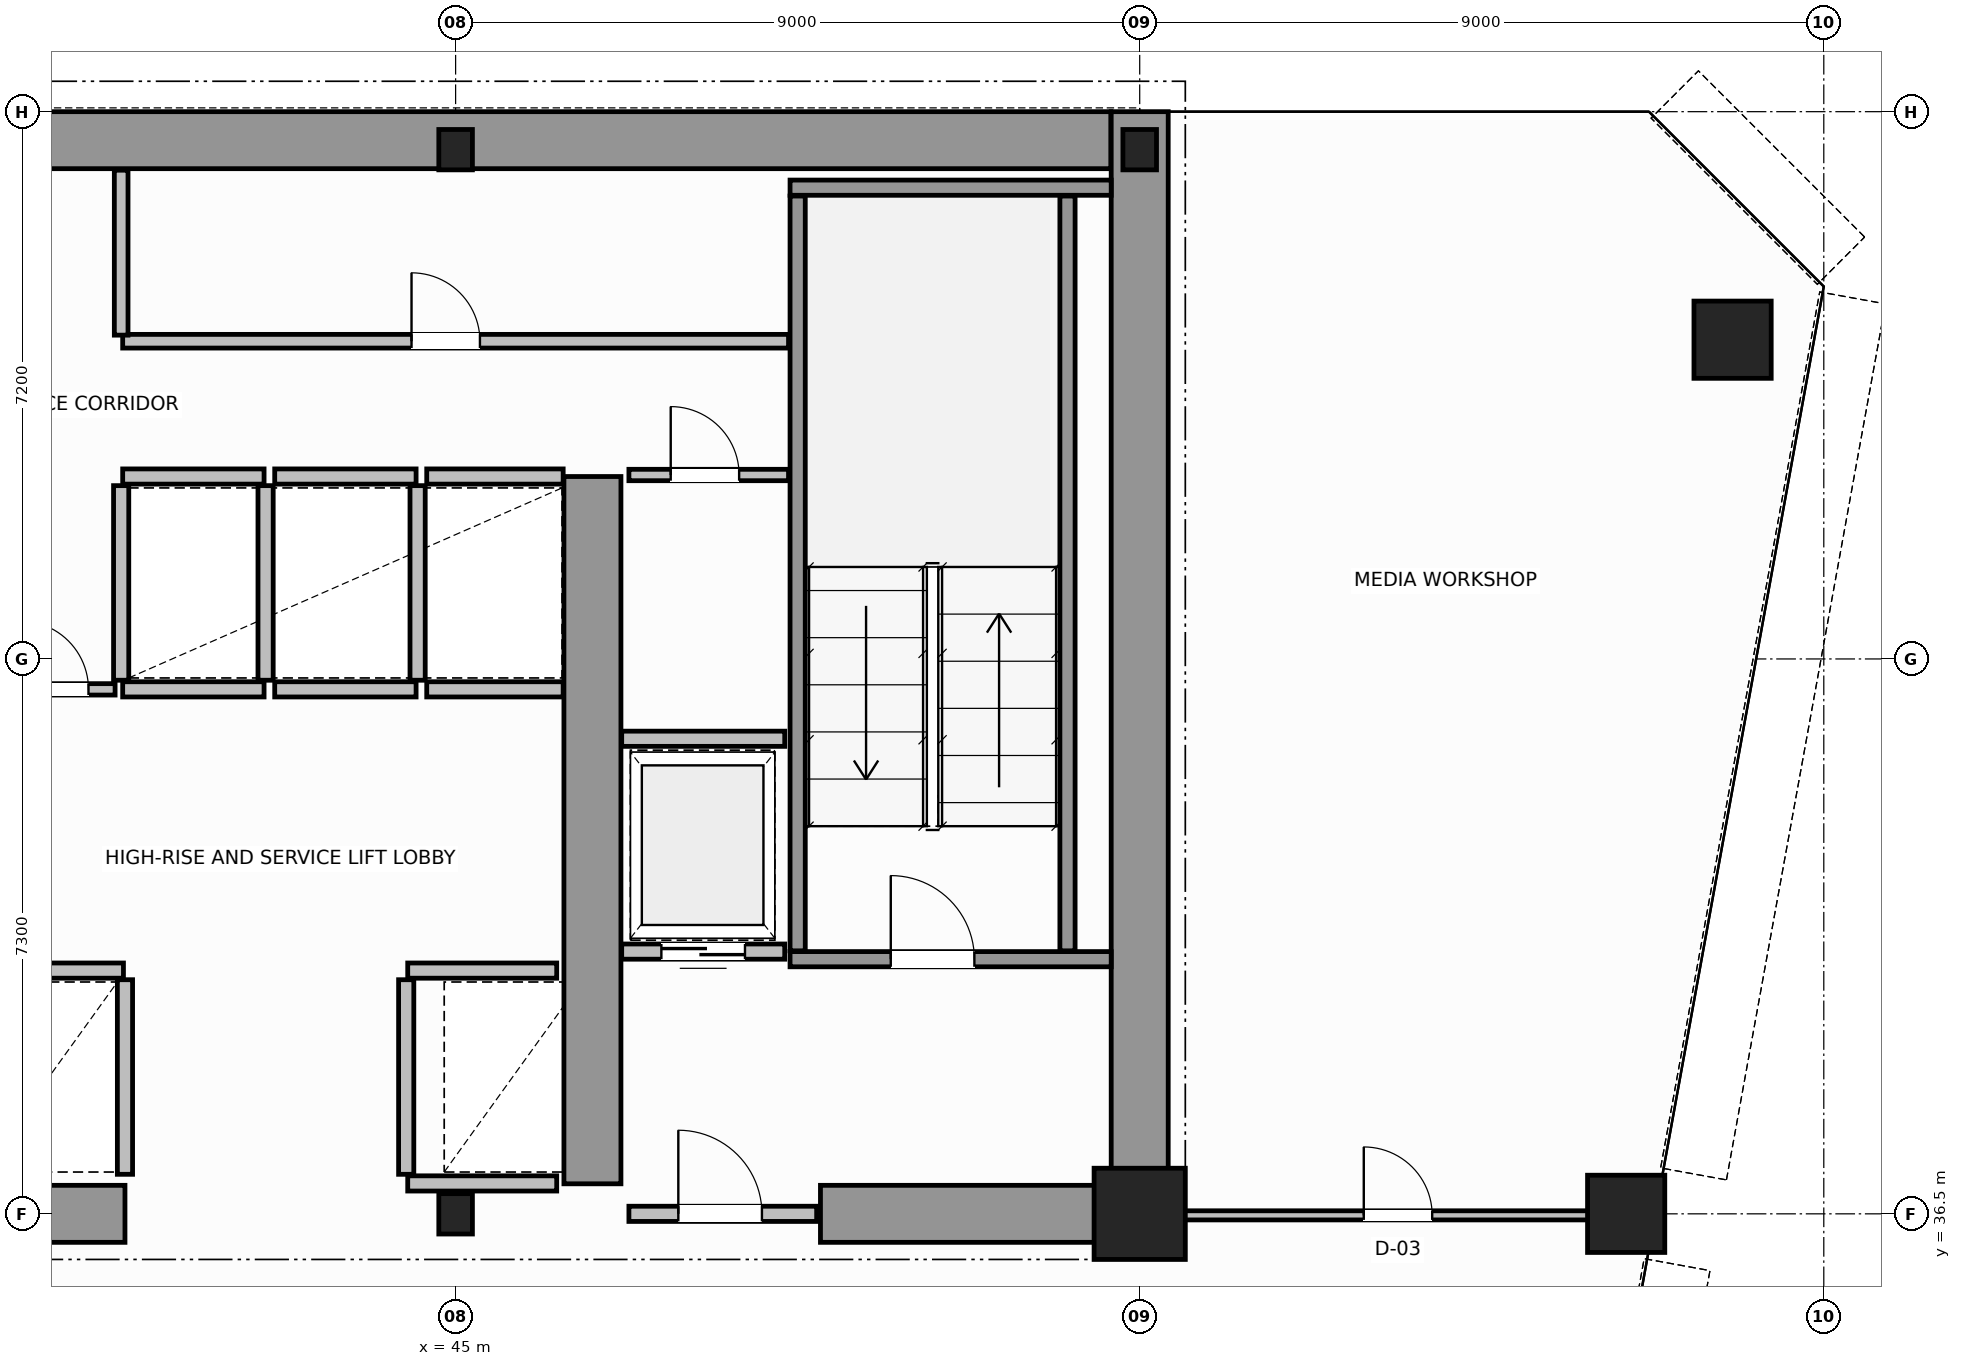
"""IFC4 building model, lengths in metres.
Left out: names, types, materials, properties, quantities, classifications, styles, units other than length and angle.
Written with IfcOpenShell. Run it as: python <this file> out.ifc"""

import sys

from ifc_helpers import new_model, si_unit, direction, frame, frame_2d, origin, origin_2d, place, context, subcontext, project, spatial, rectangle, hollow_circle, i_section, extrude, source, transform, mapped, element, fill, save


model = new_model("IFC4")
c1 = context("Model", 3, precision=1e-05, world=origin(), true_north=direction((0.0, 1.0)))
c2 = subcontext(c1, "Body", "Model", "MODEL_VIEW")
j1 = project(units=[si_unit("LENGTHUNIT", "METRE"), si_unit("PLANEANGLEUNIT", "RADIAN")], contexts=[c1])
p1 = place(None, origin())
s1 = spatial("IfcSite", under=j1, at=p1, CompositionType="ELEMENT")
p2 = place(p1, origin())
s2 = spatial("IfcBuilding", under=s1, at=p2, CompositionType="ELEMENT")
p3 = place(p2, frame((0.0, 0.0, 133.8)))
s3 = spatial("IfcBuildingStorey", under=s2, at=p3, CompositionType="ELEMENT", Elevation=133.8)
m1 = source(origin(), c2, "Body", "SweptSolid", [
    extrude(i_section(OverallWidth=0.442, OverallDepth=0.531, WebThickness=0.065, FlangeThickness=0.076, FilletRadius=0.015, at=origin_2d()), origin(), (0.0, 0.0, 1.0), 3.8),
])
p4 = place(p3, frame((45.0, 36.5, 0.0), z_axis=(0.0, 0.0, 1.0), x_axis=(1.0, 0.0, 0.0)))
e1 = element("IfcColumn", 1, at=p4, inside=s3, PredefinedType="COLUMN", context=c2, shape_type="MappedRepresentation", body=[
    mapped(m1, transform((0.0, 0.0, 0.0), scale=1.0)),
])
m2 = source(origin(), c2, "Body", "SweptSolid", [
    extrude(rectangle(XDim=1.2, YDim=1.2, at=origin_2d()), origin(), (0.0, 0.0, 1.0), 3.8),
])
p5 = place(p3, frame((54.0, 36.5, 0.0), z_axis=(0.0, 0.0, 1.0), x_axis=(1.0, 0.0, 0.0)))
e2 = element("IfcColumn", 2, at=p5, inside=s3, PredefinedType="COLUMN", context=c2, shape_type="MappedRepresentation", body=[
    mapped(m2, transform((0.0, 0.0, 0.0), scale=1.0)),
])
for number, where, z_axis, x_axis in (
    (3, (45.0, 50.5, 0.0), (0.0, 0.0, 1.0), (1.0, 0.0, 0.0)),
    (4, (54.0, 50.5, 0.0), (0.0, 0.0, 1.0), (1.0, 0.0, 0.0)),
):
    element("IfcColumn", number, at=place(p3, frame(where, z_axis=z_axis, x_axis=x_axis)), inside=s3, PredefinedType="COLUMN", context=c2, shape_type="MappedRepresentation", body=[
        mapped(m1, transform((0.0, 0.0, 0.0), scale=1.0)),
    ])
m3 = source(origin(), c2, "Body", "SweptSolid", [
    extrude(hollow_circle(Radius=0.508, WallThickness=0.045, at=origin_2d()), origin(), (0.0, 0.0, 1.0), 3.8),
])
for number, where, z_axis, x_axis in (
    (5, (61.8, 48.0, 0.0), (0.0, 0.0, 1.0), (1.0, 0.0, 0.0)),
    (6, (60.4, 36.5, 0.0), (0.0, 0.0, 1.0), (1.0, 0.0, 0.0)),
):
    element("IfcColumn", number, at=place(p3, frame(where, z_axis=z_axis, x_axis=x_axis)), inside=s3, PredefinedType="COLUMN", context=c2, shape_type="MappedRepresentation", body=[
        mapped(m3, transform((0.0, 0.0, 0.0), scale=1.0)),
    ])
p6 = place(p3, frame((34.002, 50.625, 0.0), z_axis=(0.0, 0.0, 1.0), x_axis=(1.0, 0.0, 0.0)))
e7 = element("IfcWall", 7, at=p6, inside=s3, PredefinedType="SHEAR", context=c2, shape_type="SweptSolid", body=[
    extrude(rectangle(XDim=19.619, YDim=0.75, at=frame_2d((9.81, 0.0))), origin(), (0.0, 0.0, 1.0), 3.8),
])
p7 = place(p3, frame((54.0, 36.5, 0.0), z_axis=(0.0, 0.0, 1.0), x_axis=(0.0, 1.0, 0.0)))
e8 = element("IfcWall", 8, at=p7, inside=s3, PredefinedType="SHEAR", context=c2, shape_type="SweptSolid", body=[
    extrude(rectangle(XDim=14.5, YDim=0.75, at=frame_2d((7.25, 0.0))), origin(), (0.0, 0.0, 1.0), 3.8),
])
p8 = place(p3, frame((36.15, 36.5, 0.0), z_axis=(0.0, 0.0, 1.0), x_axis=(1.0, 0.0, 0.0)))
e9 = element("IfcWall", 9, at=p8, inside=s3, PredefinedType="SHEAR", context=c2, shape_type="SweptSolid", body=[
    extrude(rectangle(XDim=4.5, YDim=0.75, at=frame_2d((2.25, 0.0))), origin(), (0.0, 0.0, 1.0), 3.8),
])
p9 = place(p3, frame((49.8, 36.5, 0.0), z_axis=(0.0, 0.0, 1.0), x_axis=(1.0, 0.0, 0.0)))
e10 = element("IfcWall", 10, at=p9, inside=s3, PredefinedType="SHEAR", context=c2, shape_type="SweptSolid", body=[
    extrude(rectangle(XDim=3.805, YDim=0.75, at=frame_2d((1.902, 0.0))), origin(), (0.0, 0.0, 1.0), 2.38),
])
p10 = place(p3, frame((46.8, 36.895, 0.0), z_axis=(0.0, 0.0, 1.0), x_axis=(0.0, 1.0, 0.0)))
e11 = element("IfcWall", 11, at=p10, inside=s3, PredefinedType="SHEAR", context=c2, shape_type="SweptSolid", body=[
    extrude(rectangle(XDim=9.305, YDim=0.75, at=frame_2d((4.652, 0.0))), origin(), (0.0, 0.0, 1.0), 3.8),
])
p11 = place(p3, frame((49.4, 39.85, 0.0), z_axis=(0.0, 0.0, 1.0), x_axis=(1.0, 0.0, 0.0)))
e12 = element("IfcWall", 12, at=p11, inside=s3, PredefinedType="SOLIDWALL", context=c2, shape_type="SweptSolid", body=[
    extrude(rectangle(XDim=4.225, YDim=0.2, at=frame_2d((2.113, 0.0))), origin(), (0.0, 0.0, 1.0), 3.8),
])
p12 = place(p11, frame((1.325, 0.0, 0.0)))
e13 = element("IfcOpeningElement", 13, at=p12, cuts=e12, PredefinedType="OPENING", context=c2, shape_type="SweptSolid", body=[
    extrude(rectangle(XDim=1.1, YDim=2.15, at=frame_2d((0.55, 1.075))), frame((0.0, 0.11, 0.0), z_axis=(0.0, -1.0, 0.0), x_axis=(1.0, 0.0, 0.0)), (0.0, 0.0, 1.0), 0.22),
])
p13 = place(p3, frame((49.4, 50.0, 0.0), z_axis=(0.0, 0.0, 1.0), x_axis=(1.0, 0.0, 0.0)))
e14 = element("IfcWall", 14, at=p13, inside=s3, PredefinedType="SOLIDWALL", context=c2, shape_type="SweptSolid", body=[
    extrude(rectangle(XDim=4.225, YDim=0.2, at=frame_2d((2.113, 0.0))), origin(), (0.0, 0.0, 1.0), 3.8),
])
for number, where, z_axis, x_axis in (
    (15, (49.5, 39.96, 0.0), (0.0, 0.0, 1.0), (0.0, 1.0, 0.0)),
    (16, (53.05, 39.96, 0.0), (0.0, 0.0, 1.0), (0.0, 1.0, 0.0)),
):
    element("IfcWall", number, at=place(p3, frame(where, z_axis=z_axis, x_axis=x_axis)), inside=s3, PredefinedType="SOLIDWALL", context=c2, shape_type="SweptSolid", body=[
        extrude(rectangle(XDim=9.93, YDim=0.2, at=frame_2d((4.965, 0.0))), origin(), (0.0, 0.0, 1.0), 3.8),
    ])
p14 = place(p3, frame((47.28, 36.5, 0.0), z_axis=(0.0, 0.0, 1.0), x_axis=(1.0, 0.0, 0.0)))
e17 = element("IfcWall", 17, at=p14, inside=s3, PredefinedType="SOLIDWALL", context=c2, shape_type="SweptSolid", body=[
    extrude(rectangle(XDim=2.47, YDim=0.2, at=frame_2d((1.235, 0.0))), origin(), (0.0, 0.0, 1.0), 2.37),
])
p15 = place(p14, frame((0.65, 0.0, 0.0)))
e18 = element("IfcOpeningElement", 18, at=p15, cuts=e17, PredefinedType="OPENING", context=c2, shape_type="SweptSolid", body=[
    extrude(rectangle(XDim=1.1, YDim=2.15, at=frame_2d((0.55, 1.075))), frame((0.0, 0.11, 0.0), z_axis=(0.0, -1.0, 0.0), x_axis=(1.0, 0.0, 0.0)), (0.0, 0.0, 1.0), 0.22),
])
p16 = place(p3, frame((38.785, 39.7, 0.0), z_axis=(0.0, 0.0, 1.0), x_axis=(1.0, 0.0, 0.0)))
e19 = element("IfcWall", 19, at=p16, inside=s3, PredefinedType="SOLIDWALL", context=c2, shape_type="SweptSolid", body=[
    extrude(rectangle(XDim=1.845, YDim=0.2, at=frame_2d((0.922, 0.0))), origin(), (0.0, 0.0, 1.0), 3.58),
])
p17 = place(p3, frame((40.65, 37.02, 0.0), z_axis=(0.0, 0.0, 1.0), x_axis=(0.0, 1.0, 0.0)))
e20 = element("IfcWall", 20, at=p17, inside=s3, PredefinedType="SOLIDWALL", context=c2, shape_type="SweptSolid", body=[
    extrude(rectangle(XDim=2.56, YDim=0.2, at=frame_2d((1.28, 0.0))), origin(), (0.0, 0.0, 1.0), 3.58),
])
p18 = place(p3, frame((44.37, 39.7, 0.0), z_axis=(0.0, 0.0, 1.0), x_axis=(1.0, 0.0, 0.0)))
e21 = element("IfcWall", 21, at=p18, inside=s3, PredefinedType="SOLIDWALL", context=c2, shape_type="SweptSolid", body=[
    extrude(rectangle(XDim=1.96, YDim=0.2, at=frame_2d((0.98, 0.0))), origin(), (0.0, 0.0, 1.0), 3.58),
])
p19 = place(p3, frame((44.37, 36.9, 0.0), z_axis=(0.0, 0.0, 1.0), x_axis=(1.0, 0.0, 0.0)))
e22 = element("IfcWall", 22, at=p19, inside=s3, PredefinedType="SOLIDWALL", context=c2, shape_type="SweptSolid", body=[
    extrude(rectangle(XDim=1.96, YDim=0.2, at=frame_2d((0.98, 0.0))), origin(), (0.0, 0.0, 1.0), 2.37),
])
p20 = place(p3, frame((44.35, 37.02, 0.0), z_axis=(0.0, 0.0, 1.0), x_axis=(0.0, 1.0, 0.0)))
e23 = element("IfcWall", 23, at=p20, inside=s3, PredefinedType="SOLIDWALL", context=c2, shape_type="SweptSolid", body=[
    extrude(rectangle(XDim=2.56, YDim=0.2, at=frame_2d((1.28, 0.0))), origin(), (0.0, 0.0, 1.0), 3.58),
])
for number, where, z_axis, x_axis in (
    (24, (40.62, 43.4, 0.0), (0.0, 0.0, 1.0), (1.0, 0.0, 0.0)),
    (25, (40.62, 46.2, 0.0), (0.0, 0.0, 1.0), (1.0, 0.0, 0.0)),
):
    element("IfcWall", number, at=place(p3, frame(where, z_axis=z_axis, x_axis=x_axis)), inside=s3, PredefinedType="SOLIDWALL", context=c2, shape_type="SweptSolid", body=[
        extrude(rectangle(XDim=1.86, YDim=0.2, at=frame_2d((0.93, 0.0))), origin(), (0.0, 0.0, 1.0), 3.58),
    ])
for number, where, z_axis, x_axis in (
    (26, (40.6, 43.52, 0.0), (0.0, 0.0, 1.0), (0.0, 1.0, 0.0)),
    (27, (42.5, 43.52, 0.0), (0.0, 0.0, 1.0), (0.0, 1.0, 0.0)),
):
    element("IfcWall", number, at=place(p3, frame(where, z_axis=z_axis, x_axis=x_axis)), inside=s3, PredefinedType="SOLIDWALL", context=c2, shape_type="SweptSolid", body=[
        extrude(rectangle(XDim=2.56, YDim=0.2, at=frame_2d((1.28, 0.0))), origin(), (0.0, 0.0, 1.0), 3.58),
    ])
for number, where, z_axis, x_axis in (
    (28, (42.62, 43.4, 0.0), (0.0, 0.0, 1.0), (1.0, 0.0, 0.0)),
    (29, (42.62, 46.2, 0.0), (0.0, 0.0, 1.0), (1.0, 0.0, 0.0)),
):
    element("IfcWall", number, at=place(p3, frame(where, z_axis=z_axis, x_axis=x_axis)), inside=s3, PredefinedType="SOLIDWALL", context=c2, shape_type="SweptSolid", body=[
        extrude(rectangle(XDim=1.86, YDim=0.2, at=frame_2d((0.93, 0.0))), origin(), (0.0, 0.0, 1.0), 3.58),
    ])
p21 = place(p3, frame((44.5, 43.52, 0.0), z_axis=(0.0, 0.0, 1.0), x_axis=(0.0, 1.0, 0.0)))
e30 = element("IfcWall", 30, at=p21, inside=s3, PredefinedType="SOLIDWALL", context=c2, shape_type="SweptSolid", body=[
    extrude(rectangle(XDim=2.56, YDim=0.2, at=frame_2d((1.28, 0.0))), origin(), (0.0, 0.0, 1.0), 3.58),
])
for number, where, z_axis, x_axis in (
    (31, (44.62, 43.4, 0.0), (0.0, 0.0, 1.0), (1.0, 0.0, 0.0)),
    (32, (44.62, 46.2, 0.0), (0.0, 0.0, 1.0), (1.0, 0.0, 0.0)),
):
    element("IfcWall", number, at=place(p3, frame(where, z_axis=z_axis, x_axis=x_axis)), inside=s3, PredefinedType="SOLIDWALL", context=c2, shape_type="SweptSolid", body=[
        extrude(rectangle(XDim=1.795, YDim=0.2, at=frame_2d((0.897, 0.0))), origin(), (0.0, 0.0, 1.0), 3.58),
    ])
p22 = place(p3, frame((47.185, 39.95, 0.0), z_axis=(0.0, 0.0, 1.0), x_axis=(1.0, 0.0, 0.0)))
e33 = element("IfcWall", 33, at=p22, inside=s3, PredefinedType="SOLIDWALL", context=c2, shape_type="SweptSolid", body=[
    extrude(rectangle(XDim=2.145, YDim=0.2, at=frame_2d((1.073, 0.0))), origin(), (0.0, 0.0, 1.0), 3.58),
])
p23 = place(p22, frame((0.522, 0.0, 0.0)))
e34 = element("IfcOpeningElement", 34, at=p23, cuts=e33, PredefinedType="OPENING", context=c2, shape_type="SweptSolid", body=[
    extrude(rectangle(XDim=1.1, YDim=2.15, at=frame_2d((0.55, 1.075))), frame((0.0, 0.11, 0.0), z_axis=(0.0, -1.0, 0.0), x_axis=(1.0, 0.0, 0.0)), (0.0, 0.0, 1.0), 0.22),
])
p24 = place(p3, frame((47.185, 42.75, 0.0), z_axis=(0.0, 0.0, 1.0), x_axis=(1.0, 0.0, 0.0)))
e35 = element("IfcWall", 35, at=p24, inside=s3, PredefinedType="SOLIDWALL", context=c2, shape_type="SweptSolid", body=[
    extrude(rectangle(XDim=2.145, YDim=0.2, at=frame_2d((1.073, 0.0))), origin(), (0.0, 0.0, 1.0), 3.58),
])
p25 = place(p3, frame((47.28, 46.22, 0.0), z_axis=(0.0, 0.0, 1.0), x_axis=(1.0, 0.0, 0.0)))
e36 = element("IfcWall", 36, at=p25, inside=s3, PredefinedType="PARTITIONING", context=c2, shape_type="SweptSolid", body=[
    extrude(rectangle(XDim=2.1, YDim=0.15, at=frame_2d((1.05, 0.0))), origin(), (0.0, 0.0, 1.0), 3.58),
])
p26 = place(p25, frame((0.55, 0.0, 0.0)))
e37 = element("IfcOpeningElement", 37, at=p26, cuts=e36, PredefinedType="OPENING", context=c2, shape_type="SweptSolid", body=[
    extrude(rectangle(XDim=0.9, YDim=2.1, at=frame_2d((0.45, 1.05))), frame((0.0, 0.085, 0.0), z_axis=(0.0, -1.0, 0.0), x_axis=(1.0, 0.0, 0.0)), (0.0, 0.0, 1.0), 0.17),
])
p27 = place(p3, frame((38.92, 43.4, 0.0), z_axis=(0.0, 0.0, 1.0), x_axis=(1.0, 0.0, 0.0)))
e38 = element("IfcWall", 38, at=p27, inside=s3, PredefinedType="PARTITIONING", context=c2, shape_type="SweptSolid", body=[
    extrude(rectangle(XDim=1.6, YDim=0.15, at=frame_2d((0.8, 0.0))), origin(), (0.0, 0.0, 1.0), 3.58),
])
p28 = place(p27, frame((0.35, 0.0, 0.0)))
e39 = element("IfcOpeningElement", 39, at=p28, cuts=e38, PredefinedType="OPENING", context=c2, shape_type="SweptSolid", body=[
    extrude(rectangle(XDim=0.9, YDim=2.1, at=frame_2d((0.45, 1.05))), frame((0.0, 0.085, 0.0), z_axis=(0.0, -1.0, 0.0), x_axis=(1.0, 0.0, 0.0)), (0.0, 0.0, 1.0), 0.17),
])
p29 = place(p3, frame((40.62, 47.98, 0.0), z_axis=(0.0, 0.0, 1.0), x_axis=(1.0, 0.0, 0.0)))
e40 = element("IfcWall", 40, at=p29, inside=s3, PredefinedType="PLUMBINGWALL", context=c2, shape_type="SweptSolid", body=[
    extrude(rectangle(XDim=8.76, YDim=0.18, at=frame_2d((4.38, 0.0))), origin(), (0.0, 0.0, 1.0), 3.58),
])
p30 = place(p29, frame((3.8, 0.0, 0.0)))
e41 = element("IfcOpeningElement", 41, at=p30, cuts=e40, PredefinedType="OPENING", context=c2, shape_type="SweptSolid", body=[
    extrude(rectangle(XDim=0.9, YDim=2.15, at=frame_2d((0.45, 1.075))), frame((0.0, 0.1, 0.0), z_axis=(0.0, -1.0, 0.0), x_axis=(1.0, 0.0, 0.0)), (0.0, 0.0, 1.0), 0.2),
])
p31 = place(p3, frame((40.6, 48.06, 0.0), z_axis=(0.0, 0.0, 1.0), x_axis=(0.0, 1.0, 0.0)))
e42 = element("IfcWall", 42, at=p31, inside=s3, PredefinedType="PLUMBINGWALL", context=c2, shape_type="SweptSolid", body=[
    extrude(rectangle(XDim=2.17, YDim=0.18, at=frame_2d((1.085, 0.0))), origin(), (0.0, 0.0, 1.0), 3.58),
])
p32 = place(p3, frame((54.06, 36.48, 0.0), z_axis=(0.0, 0.0, 1.0), x_axis=(1.0, 0.0, 0.0)))
e43 = element("IfcWall", 43, at=p32, inside=s3, PredefinedType="PARTITIONING", context=c2, shape_type="SweptSolid", body=[
    extrude(rectangle(XDim=6.675, YDim=0.12, at=frame_2d((3.337, 0.0))), origin(), (0.0, 0.0, 1.0), 2.87),
])
p33 = place(p32, frame((2.888, 0.0, 0.0)))
e44 = element("IfcOpeningElement", 44, at=p33, cuts=e43, PredefinedType="OPENING", context=c2, shape_type="SweptSolid", body=[
    extrude(rectangle(XDim=0.9, YDim=2.15, at=frame_2d((0.45, 1.075))), frame((0.0, 0.07, 0.0), z_axis=(0.0, -1.0, 0.0), x_axis=(1.0, 0.0, 0.0)), (0.0, 0.0, 1.0), 0.14),
])
m4 = source(origin(), c2, "Body", "SweptSolid", [
    extrude(rectangle(XDim=1.1, YDim=2.15, at=frame_2d((0.55, 1.075))), frame((0.0, 0.025, 0.0), z_axis=(0.0, -1.0, 0.0), x_axis=(1.0, 0.0, 0.0)), (0.0, 0.0, 1.0), 0.05),
])
p34 = place(p12, origin())
e45 = element("IfcDoor", 45, at=p34, inside=s3, OperationType="SINGLE_SWING_RIGHT", PredefinedType="DOOR", context=c2, shape_type="MappedRepresentation", body=[
    mapped(m4, transform((0.0, 0.0, 0.0), scale=1.0)),
])
fill(e13, e45)
p35 = place(p15, origin())
e46 = element("IfcDoor", 46, at=p35, inside=s3, OperationType="SINGLE_SWING_LEFT", PredefinedType="DOOR", context=c2, shape_type="MappedRepresentation", body=[
    mapped(m4, transform((0.0, 0.0, 0.0), scale=1.0)),
])
fill(e18, e46)
p36 = place(p23, origin())
e47 = element("IfcDoor", 47, at=p36, inside=s3, OperationType="DOUBLE_DOOR_SLIDING", PredefinedType="DOOR", context=c2, shape_type="MappedRepresentation", body=[
    mapped(m4, transform((0.0, 0.0, 0.0), scale=1.0)),
])
fill(e34, e47)
m5 = source(origin(), c2, "Body", "SweptSolid", [
    extrude(rectangle(XDim=0.9, YDim=2.1, at=frame_2d((0.45, 1.05))), frame((0.0, 0.025, 0.0), z_axis=(0.0, -1.0, 0.0), x_axis=(1.0, 0.0, 0.0)), (0.0, 0.0, 1.0), 0.05),
])
p37 = place(p26, origin())
e48 = element("IfcDoor", 48, at=p37, inside=s3, OperationType="SINGLE_SWING_RIGHT", PredefinedType="DOOR", context=c2, shape_type="MappedRepresentation", body=[
    mapped(m5, transform((0.0, 0.0, 0.0), scale=1.0)),
])
fill(e37, e48)
p38 = place(p28, origin())
e49 = element("IfcDoor", 49, at=p38, inside=s3, OperationType="SINGLE_SWING_LEFT", PredefinedType="DOOR", context=c2, shape_type="MappedRepresentation", body=[
    mapped(m5, transform((0.0, 0.0, 0.0), scale=1.0)),
])
fill(e39, e49)
m6 = source(origin(), c2, "Body", "SweptSolid", [
    extrude(rectangle(XDim=0.9, YDim=2.15, at=frame_2d((0.45, 1.075))), frame((0.0, 0.025, 0.0), z_axis=(0.0, -1.0, 0.0), x_axis=(1.0, 0.0, 0.0)), (0.0, 0.0, 1.0), 0.05),
])
p39 = place(p30, origin())
e50 = element("IfcDoor", 50, at=p39, inside=s3, OperationType="SINGLE_SWING_RIGHT", PredefinedType="DOOR", context=c2, shape_type="MappedRepresentation", body=[
    mapped(m6, transform((0.0, 0.0, 0.0), scale=1.0)),
])
fill(e41, e50)
p40 = place(p33, origin())
e51 = element("IfcDoor", 51, at=p40, inside=s3, OperationType="SINGLE_SWING_RIGHT", PredefinedType="DOOR", context=c2, shape_type="MappedRepresentation", body=[
    mapped(m6, transform((0.0, 0.0, 0.0), scale=1.0)),
])
fill(e44, e51)
save(model, sys.argv[1])
